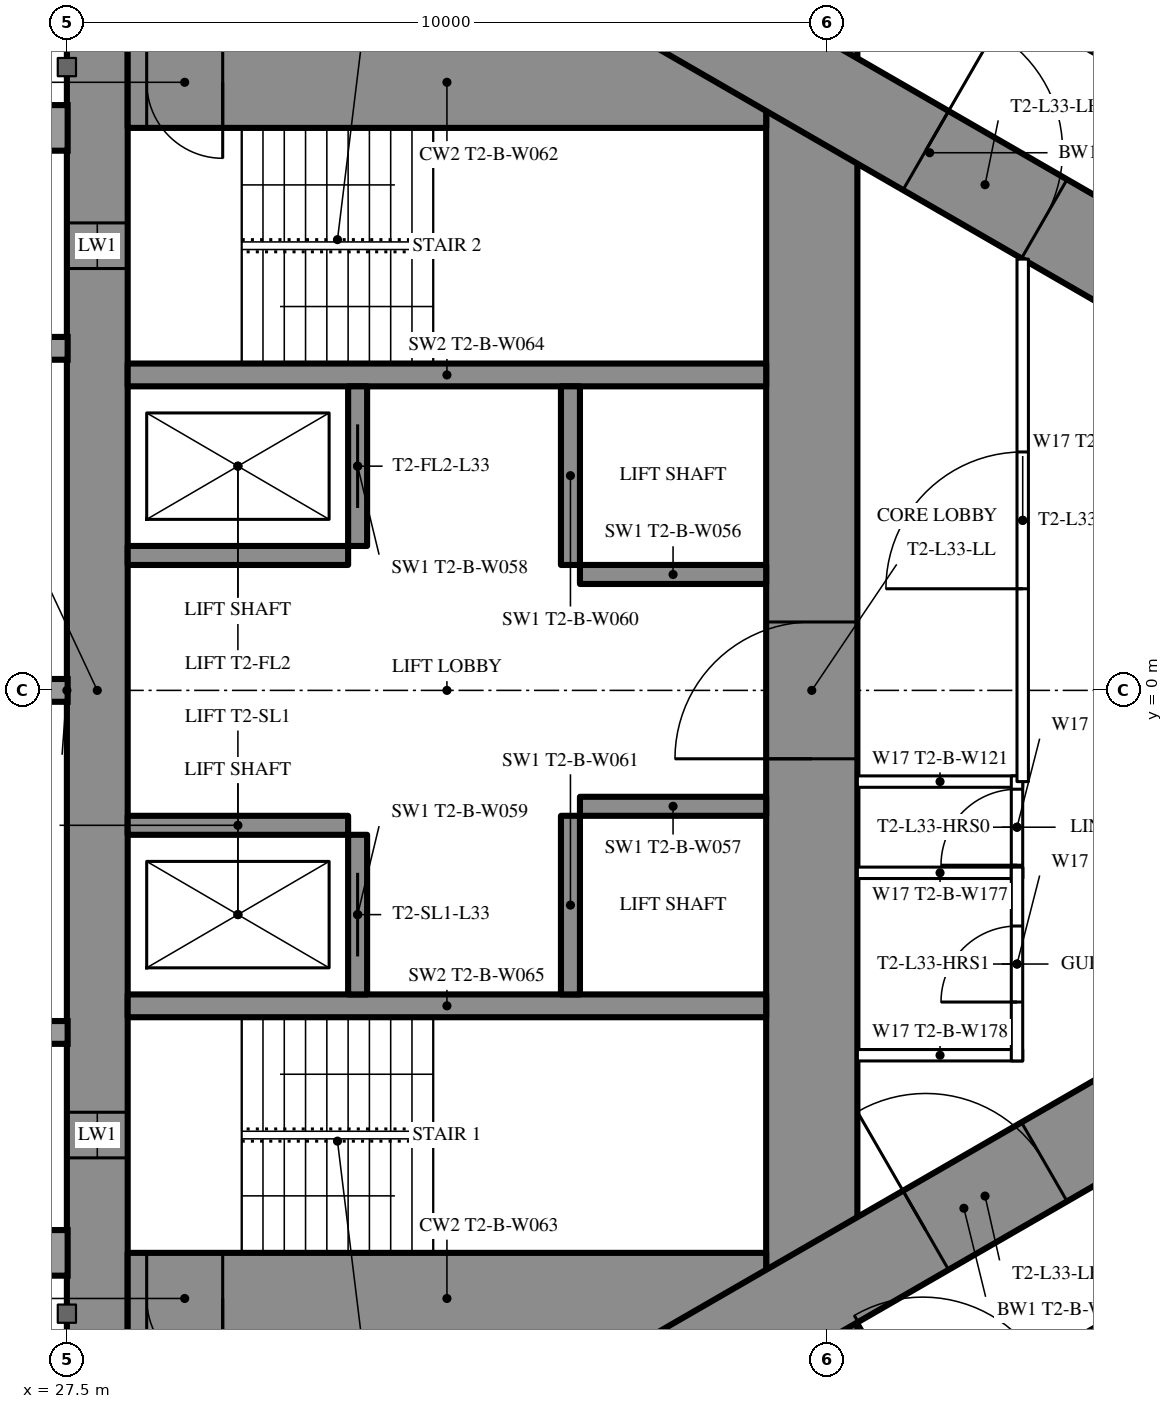
"""IFC4 building model, lengths in metres.
Left out: names, types, materials, properties, quantities, classifications, styles, units other than length and angle.
Written with IfcOpenShell. Run it as: python <this file> out.ifc"""

import sys

from ifc_helpers import new_model, si_unit, direction, frame, frame_2d, origin, place, context, subcontext, project, spatial, rectangle, extrude, element, fill, save


model = new_model("IFC4")
c1 = context("Model", 3, precision=1e-05, world=origin(), true_north=direction((0.0, 1.0)))
c2 = subcontext(c1, "Body", "Model", "MODEL_VIEW")
j1 = project(units=[si_unit("LENGTHUNIT", "METRE"), si_unit("PLANEANGLEUNIT", "RADIAN")], contexts=[c1])
p1 = place(None, origin())
s1 = spatial("IfcSite", under=j1, at=p1, CompositionType="ELEMENT")
p2 = place(p1, origin())
s2 = spatial("IfcBuilding", under=s1, at=p2, CompositionType="ELEMENT")
p3 = place(p2, frame((0.0, 0.0, 125.6)))
s3 = spatial("IfcBuildingStorey", under=s2, at=p3, CompositionType="ELEMENT", Elevation=125.6)
p4 = place(p3, frame((27.9, -8.6, 0.0), z_axis=(0.0, 0.0, 1.0), x_axis=(0.0, 1.0, 0.0)))
e1 = element("IfcWall", 1, at=p4, inside=s3, PredefinedType="SHEAR", context=c2, shape_type="SweptSolid", body=[
    extrude(rectangle(XDim=17.2, YDim=0.8, at=frame_2d((8.6, 0.0))), origin(), (0.0, 0.0, 1.0), 3.5),
])
p5 = place(p4, frame((2.45, 0.0, 0.6)))
e2 = element("IfcOpeningElement", 2, at=p5, cuts=e1, PredefinedType="OPENING", context=c2, shape_type="SweptSolid", body=[
    extrude(rectangle(XDim=0.6, YDim=2.1, at=frame_2d((0.3, 1.05))), frame((0.0, 0.41, 0.0), z_axis=(0.0, -1.0, 0.0), x_axis=(1.0, 0.0, 0.0)), (0.0, 0.0, 1.0), 0.82),
])
p6 = place(p4, frame((14.15, 0.0, 0.6)))
e3 = element("IfcOpeningElement", 3, at=p6, cuts=e1, PredefinedType="OPENING", context=c2, shape_type="SweptSolid", body=[
    extrude(rectangle(XDim=0.6, YDim=2.1, at=frame_2d((0.3, 1.05))), frame((0.0, 0.41, 0.0), z_axis=(0.0, -1.0, 0.0), x_axis=(1.0, 0.0, 0.0)), (0.0, 0.0, 1.0), 0.82),
])
p7 = place(p3, frame((37.3, -8.6, 0.0), z_axis=(0.0, 0.0, 1.0), x_axis=(0.0, 1.0, 0.0)))
e4 = element("IfcWall", 4, at=p7, inside=s3, PredefinedType="SHEAR", context=c2, shape_type="SweptSolid", body=[
    extrude(rectangle(XDim=17.2, YDim=1.2, at=frame_2d((8.6, 0.0))), origin(), (0.0, 0.0, 1.0), 3.5),
])
p8 = place(p7, frame((7.7, 0.0, 0.0)))
e5 = element("IfcOpeningElement", 5, at=p8, cuts=e4, PredefinedType="OPENING", context=c2, shape_type="SweptSolid", body=[
    extrude(rectangle(XDim=1.8, YDim=2.2, at=frame_2d((0.9, 1.1))), frame((0.0, 0.61, 0.0), z_axis=(0.0, -1.0, 0.0), x_axis=(1.0, 0.0, 0.0)), (0.0, 0.0, 1.0), 1.22),
])
p9 = place(p3, frame((28.3, -8.0, 0.0), z_axis=(0.0, 0.0, 1.0), x_axis=(1.0, 0.0, 0.0)))
e6 = element("IfcWall", 6, at=p9, inside=s3, PredefinedType="SHEAR", context=c2, shape_type="SweptSolid", body=[
    extrude(rectangle(XDim=8.4, YDim=1.2, at=frame_2d((4.2, 0.0))), origin(), (0.0, 0.0, 1.0), 3.5),
])
p10 = place(p9, frame((0.25, 0.0, 0.0)))
e7 = element("IfcOpeningElement", 7, at=p10, cuts=e6, PredefinedType="OPENING", context=c2, shape_type="SweptSolid", body=[
    extrude(rectangle(XDim=1.0, YDim=2.2, at=frame_2d((0.5, 1.1))), frame((0.0, 0.61, 0.0), z_axis=(0.0, -1.0, 0.0), x_axis=(1.0, 0.0, 0.0)), (0.0, 0.0, 1.0), 1.22),
])
p11 = place(p3, frame((28.3, 8.0, 0.0), z_axis=(0.0, 0.0, 1.0), x_axis=(1.0, 0.0, 0.0)))
e8 = element("IfcWall", 8, at=p11, inside=s3, PredefinedType="SHEAR", context=c2, shape_type="SweptSolid", body=[
    extrude(rectangle(XDim=8.4, YDim=1.2, at=frame_2d((4.2, 0.0))), origin(), (0.0, 0.0, 1.0), 3.5),
])
p12 = place(p11, frame((0.25, 0.0, 0.0)))
e9 = element("IfcOpeningElement", 9, at=p12, cuts=e8, PredefinedType="OPENING", context=c2, shape_type="SweptSolid", body=[
    extrude(rectangle(XDim=1.0, YDim=2.2, at=frame_2d((0.5, 1.1))), frame((0.0, 0.61, 0.0), z_axis=(0.0, -1.0, 0.0), x_axis=(1.0, 0.0, 0.0)), (0.0, 0.0, 1.0), 1.22),
])
for number, where, z_axis, x_axis in (
    (10, (28.3, -4.15, 0.0), (0.0, 0.0, 1.0), (1.0, 0.0, 0.0)),
    (11, (28.3, 4.15, 0.0), (0.0, 0.0, 1.0), (1.0, 0.0, 0.0)),
):
    element("IfcWall", number, at=place(p3, frame(where, z_axis=z_axis, x_axis=x_axis)), inside=s3, PredefinedType="SHEAR", context=c2, shape_type="SweptSolid", body=[
        extrude(rectangle(XDim=8.4, YDim=0.3, at=frame_2d((4.2, 0.0))), origin(), (0.0, 0.0, 1.0), 3.5),
    ])
p13 = place(p3, frame((31.325, -4.0, 0.0), z_axis=(0.0, 0.0, 1.0), x_axis=(0.0, 1.0, 0.0)))
e12 = element("IfcWall", 12, at=p13, inside=s3, PredefinedType="SHEAR", context=c2, shape_type="SweptSolid", body=[
    extrude(rectangle(XDim=2.1, YDim=0.25, at=frame_2d((1.05, 0.0))), origin(), (0.0, 0.0, 1.0), 3.5),
])
p14 = place(p13, frame((0.5, 0.0, 0.0)))
e13 = element("IfcOpeningElement", 13, at=p14, cuts=e12, PredefinedType="OPENING", context=c2, shape_type="SweptSolid", body=[
    extrude(rectangle(XDim=1.1, YDim=2.2, at=frame_2d((0.55, 1.1))), frame((0.0, 0.135, 0.0), z_axis=(0.0, -1.0, 0.0), x_axis=(1.0, 0.0, 0.0)), (0.0, 0.0, 1.0), 0.27),
])
p15 = place(p3, frame((34.125, -4.0, 0.0), z_axis=(0.0, 0.0, 1.0), x_axis=(0.0, 1.0, 0.0)))
e14 = element("IfcWall", 14, at=p15, inside=s3, PredefinedType="SHEAR", context=c2, shape_type="SweptSolid", body=[
    extrude(rectangle(XDim=2.35, YDim=0.25, at=frame_2d((1.175, 0.0))), origin(), (0.0, 0.0, 1.0), 3.5),
])
p16 = place(p3, frame((28.3, -1.775, 0.0), z_axis=(0.0, 0.0, 1.0), x_axis=(1.0, 0.0, 0.0)))
e15 = element("IfcWall", 15, at=p16, inside=s3, PredefinedType="SHEAR", context=c2, shape_type="SweptSolid", body=[
    extrude(rectangle(XDim=2.9, YDim=0.25, at=frame_2d((1.45, 0.0))), origin(), (0.0, 0.0, 1.0), 3.5),
])
p17 = place(p3, frame((34.25, -1.525, 0.0), z_axis=(0.0, 0.0, 1.0), x_axis=(1.0, 0.0, 0.0)))
e16 = element("IfcWall", 16, at=p17, inside=s3, PredefinedType="SHEAR", context=c2, shape_type="SweptSolid", body=[
    extrude(rectangle(XDim=2.45, YDim=0.25, at=frame_2d((1.225, 0.0))), origin(), (0.0, 0.0, 1.0), 3.5),
])
p18 = place(p3, frame((31.325, 1.9, 0.0), z_axis=(0.0, 0.0, 1.0), x_axis=(0.0, 1.0, 0.0)))
e17 = element("IfcWall", 17, at=p18, inside=s3, PredefinedType="SHEAR", context=c2, shape_type="SweptSolid", body=[
    extrude(rectangle(XDim=2.1, YDim=0.25, at=frame_2d((1.05, 0.0))), origin(), (0.0, 0.0, 1.0), 3.5),
])
p19 = place(p18, frame((0.5, 0.0, 0.0)))
e18 = element("IfcOpeningElement", 18, at=p19, cuts=e17, PredefinedType="OPENING", context=c2, shape_type="SweptSolid", body=[
    extrude(rectangle(XDim=1.1, YDim=2.2, at=frame_2d((0.55, 1.1))), frame((0.0, 0.135, 0.0), z_axis=(0.0, -1.0, 0.0), x_axis=(1.0, 0.0, 0.0)), (0.0, 0.0, 1.0), 0.27),
])
p20 = place(p3, frame((34.125, 1.65, 0.0), z_axis=(0.0, 0.0, 1.0), x_axis=(0.0, 1.0, 0.0)))
e19 = element("IfcWall", 19, at=p20, inside=s3, PredefinedType="SHEAR", context=c2, shape_type="SweptSolid", body=[
    extrude(rectangle(XDim=2.35, YDim=0.25, at=frame_2d((1.175, 0.0))), origin(), (0.0, 0.0, 1.0), 3.5),
])
p21 = place(p3, frame((28.3, 1.775, 0.0), z_axis=(0.0, 0.0, 1.0), x_axis=(1.0, 0.0, 0.0)))
e20 = element("IfcWall", 20, at=p21, inside=s3, PredefinedType="SHEAR", context=c2, shape_type="SweptSolid", body=[
    extrude(rectangle(XDim=2.9, YDim=0.25, at=frame_2d((1.45, 0.0))), origin(), (0.0, 0.0, 1.0), 3.5),
])
p22 = place(p3, frame((34.25, 1.525, 0.0), z_axis=(0.0, 0.0, 1.0), x_axis=(1.0, 0.0, 0.0)))
e21 = element("IfcWall", 21, at=p22, inside=s3, PredefinedType="SHEAR", context=c2, shape_type="SweptSolid", body=[
    extrude(rectangle(XDim=2.45, YDim=0.25, at=frame_2d((1.225, 0.0))), origin(), (0.0, 0.0, 1.0), 3.5),
])
p23 = place(p3, frame((27.2, -13.8, 0.0), z_axis=(0.0, 0.0, 1.0), x_axis=(0.866027159892, 0.499996958321, 0.0)))
e22 = element("IfcWall", 22, at=p23, inside=s3, PredefinedType="SHEAR", context=c2, shape_type="SweptSolid", body=[
    extrude(rectangle(XDim=27.947, YDim=1.2, at=frame_2d((13.973, 0.0))), origin(), (0.0, 0.0, 1.0), 3.5),
])
p24 = place(p23, frame((4.6, 0.0, 0.0)))
e23 = element("IfcOpeningElement", 23, at=p24, cuts=e22, PredefinedType="OPENING", context=c2, shape_type="SweptSolid", body=[
    extrude(rectangle(XDim=1.0, YDim=2.2, at=frame_2d((0.5, 1.1))), frame((0.0, 0.61, 0.0), z_axis=(0.0, -1.0, 0.0), x_axis=(1.0, 0.0, 0.0)), (0.0, 0.0, 1.0), 1.22),
])
p25 = place(p23, frame((13.395, 0.0, 0.0)))
e24 = element("IfcOpeningElement", 24, at=p25, cuts=e22, PredefinedType="OPENING", context=c2, shape_type="SweptSolid", body=[
    extrude(rectangle(XDim=1.8, YDim=2.2, at=frame_2d((0.9, 1.1))), frame((0.0, 0.61, 0.0), z_axis=(0.0, -1.0, 0.0), x_axis=(1.0, 0.0, 0.0)), (0.0, 0.0, 1.0), 1.22),
])
p26 = place(p3, frame((27.2, 13.8, 0.0), z_axis=(0.0, 0.0, 1.0), x_axis=(0.866024515034, -0.500001539357, 0.0)))
e25 = element("IfcWall", 25, at=p26, inside=s3, PredefinedType="SHEAR", context=c2, shape_type="SweptSolid", body=[
    extrude(rectangle(XDim=26.907, YDim=1.2, at=frame_2d((13.454, 0.0))), origin(), (0.0, 0.0, 1.0), 3.5),
])
p27 = place(p26, frame((4.6, 0.0, 0.0)))
e26 = element("IfcOpeningElement", 26, at=p27, cuts=e25, PredefinedType="OPENING", context=c2, shape_type="SweptSolid", body=[
    extrude(rectangle(XDim=1.0, YDim=2.2, at=frame_2d((0.5, 1.1))), frame((0.0, 0.61, 0.0), z_axis=(0.0, -1.0, 0.0), x_axis=(1.0, 0.0, 0.0)), (0.0, 0.0, 1.0), 1.22),
])
p28 = place(p26, frame((13.395, 0.0, 0.0)))
e27 = element("IfcOpeningElement", 27, at=p28, cuts=e25, PredefinedType="OPENING", context=c2, shape_type="SweptSolid", body=[
    extrude(rectangle(XDim=1.8, YDim=2.2, at=frame_2d((0.9, 1.1))), frame((0.0, 0.61, 0.0), z_axis=(0.0, -1.0, 0.0), x_axis=(1.0, 0.0, 0.0)), (0.0, 0.0, 1.0), 1.22),
])
p29 = place(p3, frame((36.834, 10.894, 0.0), z_axis=(0.0, 0.0, 1.0), x_axis=(0.866028157229, -0.499995230863, 0.0)))
e28 = element("IfcWall", 28, at=p29, inside=s3, PredefinedType="PARTITIONING", context=c2, shape_type="SweptSolid", body=[
    extrude(rectangle(XDim=21.667, YDim=0.2, at=frame_2d((10.833, 0.0))), origin(), (0.0, 0.0, 1.0), 3.25),
])
p30 = place(p29, frame((20.117, 0.0, 0.0)))
e29 = element("IfcOpeningElement", 29, at=p30, cuts=e28, PredefinedType="OPENING", context=c2, shape_type="SweptSolid", body=[
    extrude(rectangle(XDim=0.95, YDim=2.2, at=frame_2d((0.475, 1.1))), frame((0.0, 0.11, 0.0), z_axis=(0.0, -1.0, 0.0), x_axis=(1.0, 0.0, 0.0)), (0.0, 0.0, 1.0), 0.22),
])
p31 = place(p29, frame((14.04, 0.0, 0.0)))
e30 = element("IfcOpeningElement", 30, at=p31, cuts=e28, PredefinedType="OPENING", context=c2, shape_type="SweptSolid", body=[
    extrude(rectangle(XDim=0.95, YDim=2.2, at=frame_2d((0.475, 1.1))), frame((0.0, 0.11, 0.0), z_axis=(0.0, -1.0, 0.0), x_axis=(1.0, 0.0, 0.0)), (0.0, 0.0, 1.0), 0.22),
])
p32 = place(p29, frame((7.697, 0.0, 0.0)))
e31 = element("IfcOpeningElement", 31, at=p32, cuts=e28, PredefinedType="OPENING", context=c2, shape_type="SweptSolid", body=[
    extrude(rectangle(XDim=0.95, YDim=2.2, at=frame_2d((0.475, 1.1))), frame((0.0, 0.11, 0.0), z_axis=(0.0, -1.0, 0.0), x_axis=(1.0, 0.0, 0.0)), (0.0, 0.0, 1.0), 0.22),
])
p33 = place(p29, frame((3.35, 0.0, 0.0)))
e32 = element("IfcOpeningElement", 32, at=p33, cuts=e28, PredefinedType="OPENING", context=c2, shape_type="SweptSolid", body=[
    extrude(rectangle(XDim=1.0, YDim=2.2, at=frame_2d((0.5, 1.1))), frame((0.0, 0.11, 0.0), z_axis=(0.0, -1.0, 0.0), x_axis=(1.0, 0.0, 0.0)), (0.0, 0.0, 1.0), 0.22),
])
p34 = place(p3, frame((37.96, -10.243, 0.0), z_axis=(0.0, 0.0, 1.0), x_axis=(0.866042886279, 0.499969718208, 0.0)))
e33 = element("IfcWall", 33, at=p34, inside=s3, PredefinedType="PARTITIONING", context=c2, shape_type="SweptSolid", body=[
    extrude(rectangle(XDim=3.647, YDim=0.2, at=frame_2d((1.823, 0.0))), origin(), (0.0, 0.0, 1.0), 3.25),
])
p35 = place(p34, frame((0.923, 0.0, 0.0)))
e34 = element("IfcOpeningElement", 34, at=p35, cuts=e33, PredefinedType="OPENING", context=c2, shape_type="SweptSolid", body=[
    extrude(rectangle(XDim=1.8, YDim=2.2, at=frame_2d((0.9, 1.1))), frame((0.0, 0.11, 0.0), z_axis=(0.0, -1.0, 0.0), x_axis=(1.0, 0.0, 0.0)), (0.0, 0.0, 1.0), 0.22),
])
for number, where, z_axis, x_axis in (
    (35, (37.9, -1.2, 0.0), (0.0, 0.0, 1.0), (1.0, 0.0, 0.0)),
    (36, (37.9, -2.4, 0.0), (0.0, 0.0, 1.0), (1.0, 0.0, 0.0)),
    (37, (37.9, -4.8, 0.0), (0.0, 0.0, 1.0), (1.0, 0.0, 0.0)),
):
    element("IfcWall", number, at=place(p3, frame(where, z_axis=z_axis, x_axis=x_axis)), inside=s3, PredefinedType="PARTITIONING", context=c2, shape_type="SweptSolid", body=[
        extrude(rectangle(XDim=2.175, YDim=0.15, at=frame_2d((1.087, 0.0))), origin(), (0.0, 0.0, 1.0), 3.25),
    ])
p36 = place(p3, frame((40.0, -2.475, 0.0), z_axis=(0.0, 0.0, 1.0), x_axis=(0.0, 1.0, 0.0)))
e38 = element("IfcWall", 38, at=p36, inside=s3, PredefinedType="PARTITIONING", context=c2, shape_type="SweptSolid", body=[
    extrude(rectangle(XDim=1.35, YDim=0.15, at=frame_2d((0.675, 0.0))), origin(), (0.0, 0.0, 1.0), 3.25),
])
p37 = place(p36, frame((0.175, 0.0, 0.0)))
e39 = element("IfcOpeningElement", 39, at=p37, cuts=e38, PredefinedType="OPENING", context=c2, shape_type="SweptSolid", body=[
    extrude(rectangle(XDim=1.0, YDim=2.2, at=frame_2d((0.5, 1.1))), frame((0.0, 0.085, 0.0), z_axis=(0.0, -1.0, 0.0), x_axis=(1.0, 0.0, 0.0)), (0.0, 0.0, 1.0), 0.17),
])
p38 = place(p3, frame((40.0, -4.875, 0.0), z_axis=(0.0, 0.0, 1.0), x_axis=(0.0, 1.0, 0.0)))
e40 = element("IfcWall", 40, at=p38, inside=s3, PredefinedType="PARTITIONING", context=c2, shape_type="SweptSolid", body=[
    extrude(rectangle(XDim=2.55, YDim=0.15, at=frame_2d((1.275, 0.0))), origin(), (0.0, 0.0, 1.0), 3.25),
])
p39 = place(p38, frame((0.775, 0.0, 0.0)))
e41 = element("IfcOpeningElement", 41, at=p39, cuts=e40, PredefinedType="OPENING", context=c2, shape_type="SweptSolid", body=[
    extrude(rectangle(XDim=1.0, YDim=2.2, at=frame_2d((0.5, 1.1))), frame((0.0, 0.085, 0.0), z_axis=(0.0, -1.0, 0.0), x_axis=(1.0, 0.0, 0.0)), (0.0, 0.0, 1.0), 0.17),
])
p40 = place(p3, frame((40.075, -1.2, 0.0), z_axis=(0.0, 0.0, 1.0), x_axis=(0.0, 1.0, 0.0)))
e42 = element("IfcWall", 42, at=p40, inside=s3, PredefinedType="PARTITIONING", context=c2, shape_type="SweptSolid", body=[
    extrude(rectangle(XDim=6.874, YDim=0.15, at=frame_2d((3.437, 0.0))), origin(), (0.0, 0.0, 1.0), 3.25),
])
p41 = place(p40, frame((2.537, 0.0, 0.0)))
e43 = element("IfcOpeningElement", 43, at=p41, cuts=e42, PredefinedType="OPENING", context=c2, shape_type="SweptSolid", body=[
    extrude(rectangle(XDim=1.8, YDim=2.2, at=frame_2d((0.9, 1.1))), frame((0.0, 0.085, 0.0), z_axis=(0.0, -1.0, 0.0), x_axis=(1.0, 0.0, 0.0)), (0.0, 0.0, 1.0), 0.17),
])
p42 = place(p37, origin())
e44 = element("IfcDoor", 44, at=p42, inside=s3, OperationType="SINGLE_SWING_LEFT", PredefinedType="DOOR", context=c2, shape_type="SweptSolid", body=[
    extrude(rectangle(XDim=1.0, YDim=2.2, at=frame_2d((0.5, 1.1))), frame((0.0, 0.025, 0.0), z_axis=(0.0, -1.0, 0.0), x_axis=(1.0, 0.0, 0.0)), (0.0, 0.0, 1.0), 0.05),
])
fill(e39, e44)
p43 = place(p39, origin())
e45 = element("IfcDoor", 45, at=p43, inside=s3, OperationType="SINGLE_SWING_LEFT", PredefinedType="DOOR", context=c2, shape_type="SweptSolid", body=[
    extrude(rectangle(XDim=1.0, YDim=2.2, at=frame_2d((0.5, 1.1))), frame((0.0, 0.025, 0.0), z_axis=(0.0, -1.0, 0.0), x_axis=(1.0, 0.0, 0.0)), (0.0, 0.0, 1.0), 0.05),
])
fill(e41, e45)
p44 = place(p41, origin())
e46 = element("IfcDoor", 46, at=p44, inside=s3, OperationType="DOUBLE_DOOR_SINGLE_SWING", PredefinedType="DOOR", context=c2, shape_type="SweptSolid", body=[
    extrude(rectangle(XDim=1.8, YDim=2.2, at=frame_2d((0.9, 1.1))), frame((0.0, 0.025, 0.0), z_axis=(0.0, -1.0, 0.0), x_axis=(1.0, 0.0, 0.0)), (0.0, 0.0, 1.0), 0.05),
])
fill(e43, e46)
p45 = place(p25, origin())
e47 = element("IfcDoor", 47, at=p45, inside=s3, OperationType="DOUBLE_DOOR_SINGLE_SWING", PredefinedType="DOOR", context=c2, shape_type="SweptSolid", body=[
    extrude(rectangle(XDim=1.8, YDim=2.2, at=frame_2d((0.9, 1.1))), frame((0.0, 0.025, 0.0), z_axis=(0.0, -1.0, 0.0), x_axis=(1.0, 0.0, 0.0)), (0.0, 0.0, 1.0), 0.05),
])
fill(e24, e47)
p46 = place(p28, origin())
e48 = element("IfcDoor", 48, at=p46, inside=s3, OperationType="DOUBLE_DOOR_SINGLE_SWING", PredefinedType="DOOR", context=c2, shape_type="SweptSolid", body=[
    extrude(rectangle(XDim=1.8, YDim=2.2, at=frame_2d((0.9, 1.1))), frame((0.0, 0.025, 0.0), z_axis=(0.0, -1.0, 0.0), x_axis=(1.0, 0.0, 0.0)), (0.0, 0.0, 1.0), 0.05),
])
fill(e27, e48)
p47 = place(p8, origin())
e49 = element("IfcDoor", 49, at=p47, inside=s3, OperationType="DOUBLE_DOOR_SINGLE_SWING", PredefinedType="DOOR", context=c2, shape_type="SweptSolid", body=[
    extrude(rectangle(XDim=1.8, YDim=2.2, at=frame_2d((0.9, 1.1))), frame((0.0, 0.025, 0.0), z_axis=(0.0, -1.0, 0.0), x_axis=(1.0, 0.0, 0.0)), (0.0, 0.0, 1.0), 0.05),
])
fill(e5, e49)
p48 = place(p10, origin())
e50 = element("IfcDoor", 50, at=p48, inside=s3, OperationType="SINGLE_SWING_RIGHT", PredefinedType="DOOR", context=c2, shape_type="SweptSolid", body=[
    extrude(rectangle(XDim=1.0, YDim=2.2, at=frame_2d((0.5, 1.1))), frame((0.0, 0.025, 0.0), z_axis=(0.0, -1.0, 0.0), x_axis=(1.0, 0.0, 0.0)), (0.0, 0.0, 1.0), 0.05),
])
fill(e7, e50)
p49 = place(p12, origin())
e51 = element("IfcDoor", 51, at=p49, inside=s3, OperationType="SINGLE_SWING_RIGHT", PredefinedType="DOOR", context=c2, shape_type="SweptSolid", body=[
    extrude(rectangle(XDim=1.0, YDim=2.2, at=frame_2d((0.5, 1.1))), frame((0.0, 0.025, 0.0), z_axis=(0.0, -1.0, 0.0), x_axis=(1.0, 0.0, 0.0)), (0.0, 0.0, 1.0), 0.05),
])
fill(e9, e51)
p50 = place(p14, origin())
e52 = element("IfcDoor", 52, at=p50, inside=s3, OperationType="SLIDING_TO_LEFT", PredefinedType="USERDEFINED", context=c2, shape_type="SweptSolid", body=[
    extrude(rectangle(XDim=1.1, YDim=2.2, at=frame_2d((0.55, 1.1))), frame((0.0, 0.025, 0.0), z_axis=(0.0, -1.0, 0.0), x_axis=(1.0, 0.0, 0.0)), (0.0, 0.0, 1.0), 0.05),
])
fill(e13, e52)
p51 = place(p19, origin())
e53 = element("IfcDoor", 53, at=p51, inside=s3, OperationType="SLIDING_TO_LEFT", PredefinedType="USERDEFINED", context=c2, shape_type="SweptSolid", body=[
    extrude(rectangle(XDim=1.1, YDim=2.2, at=frame_2d((0.55, 1.1))), frame((0.0, 0.025, 0.0), z_axis=(0.0, -1.0, 0.0), x_axis=(1.0, 0.0, 0.0)), (0.0, 0.0, 1.0), 0.05),
])
fill(e18, e53)
p52 = place(p5, origin())
e54 = element("IfcWindow", 54, at=p52, inside=s3, PartitioningType="SINGLE_PANEL", PredefinedType="WINDOW", context=c2, shape_type="SweptSolid", body=[
    extrude(rectangle(XDim=0.6, YDim=2.1, at=frame_2d((0.3, 1.05))), frame((0.0, 0.03, 0.0), z_axis=(0.0, -1.0, 0.0), x_axis=(1.0, 0.0, 0.0)), (0.0, 0.0, 1.0), 0.06),
])
fill(e2, e54)
p53 = place(p6, origin())
e55 = element("IfcWindow", 55, at=p53, inside=s3, PartitioningType="SINGLE_PANEL", PredefinedType="WINDOW", context=c2, shape_type="SweptSolid", body=[
    extrude(rectangle(XDim=0.6, YDim=2.1, at=frame_2d((0.3, 1.05))), frame((0.0, 0.03, 0.0), z_axis=(0.0, -1.0, 0.0), x_axis=(1.0, 0.0, 0.0)), (0.0, 0.0, 1.0), 0.06),
])
fill(e3, e55)
save(model, sys.argv[1])
